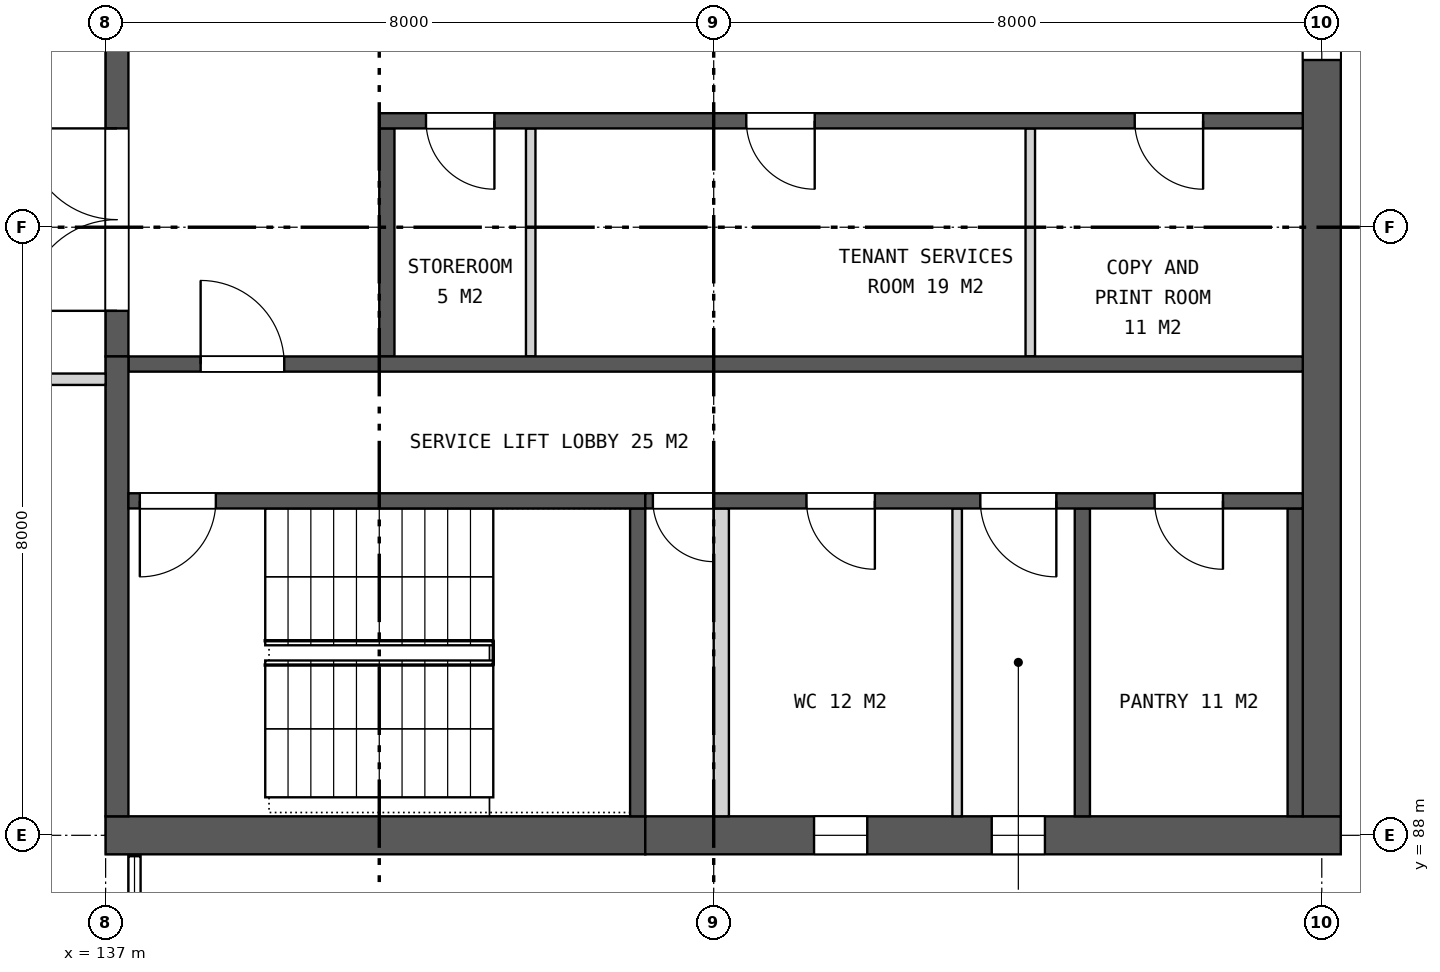
"""IFC4 building model, lengths in metres.
Left out: names, types, materials, properties, quantities, classifications, styles, units other than length and angle.
Written with IfcOpenShell. Run it as: python <this file> out.ifc"""

import sys

from ifc_helpers import new_model, si_unit, direction, frame, frame_2d, origin, place, context, subcontext, project, spatial, rectangle, extrude, element, fill, save


model = new_model("IFC4")
c1 = context("Model", 3, precision=1e-05, world=origin(), true_north=direction((0.0, 1.0)))
c2 = subcontext(c1, "Body", "Model", "MODEL_VIEW")
j1 = project(units=[si_unit("LENGTHUNIT", "METRE"), si_unit("PLANEANGLEUNIT", "RADIAN")], contexts=[c1])
p1 = place(None, origin())
s1 = spatial("IfcSite", under=j1, at=p1, CompositionType="ELEMENT")
p2 = place(p1, origin())
s2 = spatial("IfcBuilding", under=s1, at=p2, CompositionType="ELEMENT")
p3 = place(p2, frame((0.0, 0.0, 295.5)))
s3 = spatial("IfcBuildingStorey", under=s2, at=p3, CompositionType="ELEMENT", Elevation=295.5)
p4 = place(p3, frame((137.0, 88.0, 0.0), z_axis=(0.0, 0.0, 1.0), x_axis=(1.0, 0.0, 0.0)))
e1 = element("IfcWall", 1, at=p4, inside=s3, PredefinedType="SHEAR", context=c2, shape_type="SweptSolid", body=[
    extrude(rectangle(XDim=7.1, YDim=0.5, at=frame_2d((3.55, 0.0))), origin(), (0.0, 0.0, 1.0), 4.2),
])
p5 = place(p3, frame((144.1, 88.0, 0.0), z_axis=(0.0, 0.0, 1.0), x_axis=(1.0, 0.0, 0.0)))
e2 = element("IfcWall", 2, at=p5, inside=s3, PredefinedType="SHEAR", context=c2, shape_type="SweptSolid", body=[
    extrude(rectangle(XDim=9.15, YDim=0.5, at=frame_2d((4.575, 0.0))), origin(), (0.0, 0.0, 1.0), 4.2),
])
p6 = place(p5, frame((2.22, 0.0, 1.5)))
e3 = element("IfcOpeningElement", 3, at=p6, cuts=e2, PredefinedType="OPENING", context=c2, shape_type="SweptSolid", body=[
    extrude(rectangle(XDim=0.7, YDim=0.9, at=frame_2d((0.35, 0.45))), frame((0.0, 0.26, 0.0), z_axis=(0.0, -1.0, 0.0), x_axis=(1.0, 0.0, 0.0)), (0.0, 0.0, 1.0), 0.52),
])
p7 = place(p5, frame((4.558, 0.0, 1.5)))
e4 = element("IfcOpeningElement", 4, at=p7, cuts=e2, PredefinedType="OPENING", context=c2, shape_type="SweptSolid", body=[
    extrude(rectangle(XDim=0.7, YDim=0.9, at=frame_2d((0.35, 0.45))), frame((0.0, 0.26, 0.0), z_axis=(0.0, -1.0, 0.0), x_axis=(1.0, 0.0, 0.0)), (0.0, 0.0, 1.0), 0.52),
])
p8 = place(p3, frame((153.0, 88.25, 0.0), z_axis=(0.0, 0.0, 1.0), x_axis=(0.0, 1.0, 0.0)))
e5 = element("IfcWall", 5, at=p8, inside=s3, PredefinedType="SHEAR", context=c2, shape_type="SweptSolid", body=[
    extrude(rectangle(XDim=23.5, YDim=0.5, at=frame_2d((11.75, 0.0))), origin(), (0.0, 0.0, 1.0), 4.2),
])
p9 = place(p8, frame((9.95, 0.0, 0.15)))
e6 = element("IfcOpeningElement", 6, at=p9, cuts=e5, PredefinedType="OPENING", context=c2, shape_type="SweptSolid", body=[
    extrude(rectangle(XDim=3.6, YDim=3.0, at=frame_2d((1.8, 1.5))), frame((0.0, 0.26, 0.0), z_axis=(0.0, -1.0, 0.0), x_axis=(1.0, 0.0, 0.0)), (0.0, 0.0, 1.0), 0.52),
])
p10 = place(p3, frame((137.15, 94.3, 0.0), z_axis=(0.0, 0.0, 1.0), x_axis=(0.0, 1.0, 0.0)))
e7 = element("IfcWall", 7, at=p10, inside=s3, PredefinedType="SHEAR", context=c2, shape_type="SweptSolid", body=[
    extrude(rectangle(XDim=11.4, YDim=0.3, at=frame_2d((5.7, 0.0))), origin(), (0.0, 0.0, 1.0), 4.2),
])
p11 = place(p10, frame((0.6, 0.0, 0.0)))
e8 = element("IfcOpeningElement", 8, at=p11, cuts=e7, PredefinedType="OPENING", context=c2, shape_type="SweptSolid", body=[
    extrude(rectangle(XDim=2.4, YDim=2.4, at=frame_2d((1.2, 1.2))), frame((0.0, 0.16, 0.0), z_axis=(0.0, -1.0, 0.0), x_axis=(1.0, 0.0, 0.0)), (0.0, 0.0, 1.0), 0.32),
])
p12 = place(p10, frame((4.5, 0.0, 0.0)))
e9 = element("IfcOpeningElement", 9, at=p12, cuts=e7, PredefinedType="OPENING", context=c2, shape_type="SweptSolid", body=[
    extrude(rectangle(XDim=2.4, YDim=2.4, at=frame_2d((1.2, 1.2))), frame((0.0, 0.16, 0.0), z_axis=(0.0, -1.0, 0.0), x_axis=(1.0, 0.0, 0.0)), (0.0, 0.0, 1.0), 0.32),
])
p13 = place(p10, frame((8.4, 0.0, 0.0)))
e10 = element("IfcOpeningElement", 10, at=p13, cuts=e7, PredefinedType="OPENING", context=c2, shape_type="SweptSolid", body=[
    extrude(rectangle(XDim=2.4, YDim=2.4, at=frame_2d((1.2, 1.2))), frame((0.0, 0.16, 0.0), z_axis=(0.0, -1.0, 0.0), x_axis=(1.0, 0.0, 0.0)), (0.0, 0.0, 1.0), 0.32),
])
p14 = place(p3, frame((140.7, 94.3, 0.0), z_axis=(0.0, 0.0, 1.0), x_axis=(0.0, 1.0, 0.0)))
e11 = element("IfcWall", 11, at=p14, inside=s3, PredefinedType="SHEAR", context=c2, shape_type="SweptSolid", body=[
    extrude(rectangle(XDim=3.0, YDim=0.2, at=frame_2d((1.5, 0.0))), origin(), (0.0, 0.0, 1.0), 4.2),
])
for number, where, z_axis, x_axis in (
    (12, (142.593, 94.3, 0.0), (0.0, 0.0, 1.0), (0.0, 1.0, 0.0)),
    (13, (149.165, 94.3, 0.0), (0.0, 0.0, 1.0), (0.0, 1.0, 0.0)),
):
    element("IfcWall", number, at=place(p3, frame(where, z_axis=z_axis, x_axis=x_axis)), inside=s3, PredefinedType="PARTITIONING", context=c2, shape_type="SweptSolid", body=[
        extrude(rectangle(XDim=3.0, YDim=0.125, at=frame_2d((1.5, 0.0))), origin(), (0.0, 0.0, 1.0), 4.2),
    ])
p15 = place(p3, frame((140.6, 97.4, 0.0), z_axis=(0.0, 0.0, 1.0), x_axis=(1.0, 0.0, 0.0)))
e14 = element("IfcWall", 14, at=p15, inside=s3, PredefinedType="SHEAR", context=c2, shape_type="SweptSolid", body=[
    extrude(rectangle(XDim=12.15, YDim=0.2, at=frame_2d((6.075, 0.0))), origin(), (0.0, 0.0, 1.0), 4.2),
])
p16 = place(p15, frame((0.615, 0.0, 0.0)))
e15 = element("IfcOpeningElement", 15, at=p16, cuts=e14, PredefinedType="OPENING", context=c2, shape_type="SweptSolid", body=[
    extrude(rectangle(XDim=0.9, YDim=2.1, at=frame_2d((0.45, 1.05))), frame((0.0, 0.11, 0.0), z_axis=(0.0, -1.0, 0.0), x_axis=(1.0, 0.0, 0.0)), (0.0, 0.0, 1.0), 0.22),
])
p17 = place(p15, frame((4.829, 0.0, 0.0)))
e16 = element("IfcOpeningElement", 16, at=p17, cuts=e14, PredefinedType="OPENING", context=c2, shape_type="SweptSolid", body=[
    extrude(rectangle(XDim=0.9, YDim=2.1, at=frame_2d((0.45, 1.05))), frame((0.0, 0.11, 0.0), z_axis=(0.0, -1.0, 0.0), x_axis=(1.0, 0.0, 0.0)), (0.0, 0.0, 1.0), 0.22),
])
p18 = place(p15, frame((9.939, 0.0, 0.0)))
e17 = element("IfcOpeningElement", 17, at=p18, cuts=e14, PredefinedType="OPENING", context=c2, shape_type="SweptSolid", body=[
    extrude(rectangle(XDim=0.9, YDim=2.1, at=frame_2d((0.45, 1.05))), frame((0.0, 0.11, 0.0), z_axis=(0.0, -1.0, 0.0), x_axis=(1.0, 0.0, 0.0)), (0.0, 0.0, 1.0), 0.22),
])
p19 = place(p3, frame((137.3, 94.2, 0.0), z_axis=(0.0, 0.0, 1.0), x_axis=(1.0, 0.0, 0.0)))
e18 = element("IfcWall", 18, at=p19, inside=s3, PredefinedType="SHEAR", context=c2, shape_type="SweptSolid", body=[
    extrude(rectangle(XDim=15.45, YDim=0.2, at=frame_2d((7.725, 0.0))), origin(), (0.0, 0.0, 1.0), 4.2),
])
p20 = place(p19, frame((0.95, 0.0, 0.0)))
e19 = element("IfcOpeningElement", 19, at=p20, cuts=e18, PredefinedType="OPENING", context=c2, shape_type="SweptSolid", body=[
    extrude(rectangle(XDim=1.1, YDim=2.1, at=frame_2d((0.55, 1.05))), frame((0.0, 0.11, 0.0), z_axis=(0.0, -1.0, 0.0), x_axis=(1.0, 0.0, 0.0)), (0.0, 0.0, 1.0), 0.22),
])
p21 = place(p3, frame((137.15, 88.25, 0.0), z_axis=(0.0, 0.0, 1.0), x_axis=(0.0, 1.0, 0.0)))
e20 = element("IfcWall", 20, at=p21, inside=s3, PredefinedType="SHEAR", context=c2, shape_type="SweptSolid", body=[
    extrude(rectangle(XDim=6.05, YDim=0.3, at=frame_2d((3.025, 0.0))), origin(), (0.0, 0.0, 1.0), 4.2),
])
for number, where, z_axis, x_axis in (
    (21, (144.0, 88.25, 0.0), (0.0, 0.0, 1.0), (0.0, 1.0, 0.0)),
    (22, (149.85, 88.25, 0.0), (0.0, 0.0, 1.0), (0.0, 1.0, 0.0)),
    (23, (152.65, 88.25, 0.0), (0.0, 0.0, 1.0), (0.0, 1.0, 0.0)),
):
    element("IfcWall", number, at=place(p3, frame(where, z_axis=z_axis, x_axis=x_axis)), inside=s3, PredefinedType="SHEAR", context=c2, shape_type="SweptSolid", body=[
        extrude(rectangle(XDim=4.05, YDim=0.2, at=frame_2d((2.025, 0.0))), origin(), (0.0, 0.0, 1.0), 4.2),
    ])
p22 = place(p3, frame((145.1, 88.25, 0.0), z_axis=(0.0, 0.0, 1.0), x_axis=(0.0, 1.0, 0.0)))
e24 = element("IfcWall", 24, at=p22, inside=s3, PredefinedType="PARTITIONING", context=c2, shape_type="SweptSolid", body=[
    extrude(rectangle(XDim=4.05, YDim=0.2, at=frame_2d((2.025, 0.0))), origin(), (0.0, 0.0, 1.0), 4.2),
])
p23 = place(p3, frame((148.203, 88.25, 0.0), z_axis=(0.0, 0.0, 1.0), x_axis=(0.0, 1.0, 0.0)))
e25 = element("IfcWall", 25, at=p23, inside=s3, PredefinedType="PARTITIONING", context=c2, shape_type="SweptSolid", body=[
    extrude(rectangle(XDim=4.05, YDim=0.125, at=frame_2d((2.025, 0.0))), origin(), (0.0, 0.0, 1.0), 4.2),
])
p24 = place(p3, frame((137.3, 92.4, 0.0), z_axis=(0.0, 0.0, 1.0), x_axis=(1.0, 0.0, 0.0)))
e26 = element("IfcWall", 26, at=p24, inside=s3, PredefinedType="SHEAR", context=c2, shape_type="SweptSolid", body=[
    extrude(rectangle(XDim=6.8, YDim=0.2, at=frame_2d((3.4, 0.0))), origin(), (0.0, 0.0, 1.0), 4.2),
])
p25 = place(p24, frame((0.15, 0.0, 0.0)))
e27 = element("IfcOpeningElement", 27, at=p25, cuts=e26, PredefinedType="OPENING", context=c2, shape_type="SweptSolid", body=[
    extrude(rectangle(XDim=1.0, YDim=2.1, at=frame_2d((0.5, 1.05))), frame((0.0, 0.11, 0.0), z_axis=(0.0, -1.0, 0.0), x_axis=(1.0, 0.0, 0.0)), (0.0, 0.0, 1.0), 0.22),
])
p26 = place(p3, frame((144.1, 92.4, 0.0), z_axis=(0.0, 0.0, 1.0), x_axis=(1.0, 0.0, 0.0)))
e28 = element("IfcWall", 28, at=p26, inside=s3, PredefinedType="SHEAR", context=c2, shape_type="SweptSolid", body=[
    extrude(rectangle(XDim=8.65, YDim=0.2, at=frame_2d((4.325, 0.0))), origin(), (0.0, 0.0, 1.0), 4.2),
])
p27 = place(p26, frame((0.1, 0.0, 0.0)))
e29 = element("IfcOpeningElement", 29, at=p27, cuts=e28, PredefinedType="OPENING", context=c2, shape_type="SweptSolid", body=[
    extrude(rectangle(XDim=0.8, YDim=2.1, at=frame_2d((0.4, 1.05))), frame((0.0, 0.11, 0.0), z_axis=(0.0, -1.0, 0.0), x_axis=(1.0, 0.0, 0.0)), (0.0, 0.0, 1.0), 0.22),
])
p28 = place(p26, frame((2.12, 0.0, 0.0)))
e30 = element("IfcOpeningElement", 30, at=p28, cuts=e28, PredefinedType="OPENING", context=c2, shape_type="SweptSolid", body=[
    extrude(rectangle(XDim=0.9, YDim=2.1, at=frame_2d((0.45, 1.05))), frame((0.0, 0.11, 0.0), z_axis=(0.0, -1.0, 0.0), x_axis=(1.0, 0.0, 0.0)), (0.0, 0.0, 1.0), 0.22),
])
p29 = place(p26, frame((4.408, 0.0, 0.0)))
e31 = element("IfcOpeningElement", 31, at=p29, cuts=e28, PredefinedType="OPENING", context=c2, shape_type="SweptSolid", body=[
    extrude(rectangle(XDim=1.0, YDim=2.1, at=frame_2d((0.5, 1.05))), frame((0.0, 0.11, 0.0), z_axis=(0.0, -1.0, 0.0), x_axis=(1.0, 0.0, 0.0)), (0.0, 0.0, 1.0), 0.22),
])
p30 = place(p26, frame((6.7, 0.0, 0.0)))
e32 = element("IfcOpeningElement", 32, at=p30, cuts=e28, PredefinedType="OPENING", context=c2, shape_type="SweptSolid", body=[
    extrude(rectangle(XDim=0.9, YDim=2.1, at=frame_2d((0.45, 1.05))), frame((0.0, 0.11, 0.0), z_axis=(0.0, -1.0, 0.0), x_axis=(1.0, 0.0, 0.0)), (0.0, 0.0, 1.0), 0.22),
])
p31 = place(p3, frame((131.475, 94.0, 0.0), z_axis=(0.0, 0.0, 1.0), x_axis=(1.0, 0.0, 0.0)))
e33 = element("IfcWall", 33, at=p31, inside=s3, PredefinedType="PARTITIONING", context=c2, shape_type="SweptSolid", body=[
    extrude(rectangle(XDim=5.525, YDim=0.15, at=frame_2d((2.762, 0.0))), origin(), (0.0, 0.0, 1.0), 3.443),
])
p32 = place(p6, origin())
e34 = element("IfcWindow", 34, at=p32, inside=s3, PartitioningType="SINGLE_PANEL", PredefinedType="WINDOW", context=c2, shape_type="SweptSolid", body=[
    extrude(rectangle(XDim=0.7, YDim=0.9, at=frame_2d((0.35, 0.45))), frame((0.0, 0.03, 0.0), z_axis=(0.0, -1.0, 0.0), x_axis=(1.0, 0.0, 0.0)), (0.0, 0.0, 1.0), 0.06),
])
fill(e3, e34)
p33 = place(p7, origin())
e35 = element("IfcWindow", 35, at=p33, inside=s3, PartitioningType="SINGLE_PANEL", PredefinedType="WINDOW", context=c2, shape_type="SweptSolid", body=[
    extrude(rectangle(XDim=0.7, YDim=0.9, at=frame_2d((0.35, 0.45))), frame((0.0, 0.03, 0.0), z_axis=(0.0, -1.0, 0.0), x_axis=(1.0, 0.0, 0.0)), (0.0, 0.0, 1.0), 0.06),
])
fill(e4, e35)
p34 = place(p9, origin())
e36 = element("IfcWindow", 36, at=p34, inside=s3, PartitioningType="SINGLE_PANEL", PredefinedType="WINDOW", context=c2, shape_type="SweptSolid", body=[
    extrude(rectangle(XDim=3.6, YDim=3.0, at=frame_2d((1.8, 1.5))), frame((0.0, 0.03, 0.0), z_axis=(0.0, -1.0, 0.0), x_axis=(1.0, 0.0, 0.0)), (0.0, 0.0, 1.0), 0.06),
])
fill(e6, e36)
p35 = place(p11, origin())
e37 = element("IfcDoor", 37, at=p35, inside=s3, OperationType="DOUBLE_DOOR_SINGLE_SWING", PredefinedType="DOOR", context=c2, shape_type="SweptSolid", body=[
    extrude(rectangle(XDim=2.4, YDim=2.4, at=frame_2d((1.2, 1.2))), frame((0.0, 0.025, 0.0), z_axis=(0.0, -1.0, 0.0), x_axis=(1.0, 0.0, 0.0)), (0.0, 0.0, 1.0), 0.05),
])
fill(e8, e37)
p36 = place(p16, frame((0.9, 0.0, 0.0), z_axis=(0.0, 0.0, 1.0), x_axis=(-1.0, 0.0, 0.0)))
e38 = element("IfcDoor", 38, at=p36, inside=s3, OperationType="SINGLE_SWING_LEFT", PredefinedType="DOOR", context=c2, shape_type="SweptSolid", body=[
    extrude(rectangle(XDim=0.9, YDim=2.1, at=frame_2d((0.45, 1.05))), frame((0.0, 0.025, 0.0), z_axis=(0.0, -1.0, 0.0), x_axis=(1.0, 0.0, 0.0)), (0.0, 0.0, 1.0), 0.05),
])
fill(e15, e38)
p37 = place(p17, frame((0.9, 0.0, 0.0), z_axis=(0.0, 0.0, 1.0), x_axis=(-1.0, 0.0, 0.0)))
e39 = element("IfcDoor", 39, at=p37, inside=s3, OperationType="SINGLE_SWING_LEFT", PredefinedType="DOOR", context=c2, shape_type="SweptSolid", body=[
    extrude(rectangle(XDim=0.9, YDim=2.1, at=frame_2d((0.45, 1.05))), frame((0.0, 0.025, 0.0), z_axis=(0.0, -1.0, 0.0), x_axis=(1.0, 0.0, 0.0)), (0.0, 0.0, 1.0), 0.05),
])
fill(e16, e39)
p38 = place(p18, frame((0.9, 0.0, 0.0), z_axis=(0.0, 0.0, 1.0), x_axis=(-1.0, 0.0, 0.0)))
e40 = element("IfcDoor", 40, at=p38, inside=s3, OperationType="SINGLE_SWING_LEFT", PredefinedType="DOOR", context=c2, shape_type="SweptSolid", body=[
    extrude(rectangle(XDim=0.9, YDim=2.1, at=frame_2d((0.45, 1.05))), frame((0.0, 0.025, 0.0), z_axis=(0.0, -1.0, 0.0), x_axis=(1.0, 0.0, 0.0)), (0.0, 0.0, 1.0), 0.05),
])
fill(e17, e40)
p39 = place(p20, origin())
e41 = element("IfcDoor", 41, at=p39, inside=s3, OperationType="SINGLE_SWING_LEFT", PredefinedType="DOOR", context=c2, shape_type="SweptSolid", body=[
    extrude(rectangle(XDim=1.1, YDim=2.1, at=frame_2d((0.55, 1.05))), frame((0.0, 0.025, 0.0), z_axis=(0.0, -1.0, 0.0), x_axis=(1.0, 0.0, 0.0)), (0.0, 0.0, 1.0), 0.05),
])
fill(e19, e41)
p40 = place(p25, frame((1.0, 0.0, 0.0), z_axis=(0.0, 0.0, 1.0), x_axis=(-1.0, 0.0, 0.0)))
e42 = element("IfcDoor", 42, at=p40, inside=s3, OperationType="SINGLE_SWING_RIGHT", PredefinedType="DOOR", context=c2, shape_type="SweptSolid", body=[
    extrude(rectangle(XDim=1.0, YDim=2.1, at=frame_2d((0.5, 1.05))), frame((0.0, 0.025, 0.0), z_axis=(0.0, -1.0, 0.0), x_axis=(1.0, 0.0, 0.0)), (0.0, 0.0, 1.0), 0.05),
])
fill(e27, e42)
p41 = place(p27, frame((0.8, 0.0, 0.0), z_axis=(0.0, 0.0, 1.0), x_axis=(-1.0, 0.0, 0.0)))
e43 = element("IfcDoor", 43, at=p41, inside=s3, OperationType="SINGLE_SWING_LEFT", PredefinedType="DOOR", context=c2, shape_type="SweptSolid", body=[
    extrude(rectangle(XDim=0.8, YDim=2.1, at=frame_2d((0.4, 1.05))), frame((0.0, 0.025, 0.0), z_axis=(0.0, -1.0, 0.0), x_axis=(1.0, 0.0, 0.0)), (0.0, 0.0, 1.0), 0.05),
])
fill(e29, e43)
p42 = place(p28, frame((0.9, 0.0, 0.0), z_axis=(0.0, 0.0, 1.0), x_axis=(-1.0, 0.0, 0.0)))
e44 = element("IfcDoor", 44, at=p42, inside=s3, OperationType="SINGLE_SWING_LEFT", PredefinedType="DOOR", context=c2, shape_type="SweptSolid", body=[
    extrude(rectangle(XDim=0.9, YDim=2.1, at=frame_2d((0.45, 1.05))), frame((0.0, 0.025, 0.0), z_axis=(0.0, -1.0, 0.0), x_axis=(1.0, 0.0, 0.0)), (0.0, 0.0, 1.0), 0.05),
])
fill(e30, e44)
p43 = place(p29, frame((1.0, 0.0, 0.0), z_axis=(0.0, 0.0, 1.0), x_axis=(-1.0, 0.0, 0.0)))
e45 = element("IfcDoor", 45, at=p43, inside=s3, OperationType="SINGLE_SWING_LEFT", PredefinedType="DOOR", context=c2, shape_type="SweptSolid", body=[
    extrude(rectangle(XDim=1.0, YDim=2.1, at=frame_2d((0.5, 1.05))), frame((0.0, 0.025, 0.0), z_axis=(0.0, -1.0, 0.0), x_axis=(1.0, 0.0, 0.0)), (0.0, 0.0, 1.0), 0.05),
])
fill(e31, e45)
p44 = place(p30, frame((0.9, 0.0, 0.0), z_axis=(0.0, 0.0, 1.0), x_axis=(-1.0, 0.0, 0.0)))
e46 = element("IfcDoor", 46, at=p44, inside=s3, OperationType="SINGLE_SWING_LEFT", PredefinedType="DOOR", context=c2, shape_type="SweptSolid", body=[
    extrude(rectangle(XDim=0.9, YDim=2.1, at=frame_2d((0.45, 1.05))), frame((0.0, 0.025, 0.0), z_axis=(0.0, -1.0, 0.0), x_axis=(1.0, 0.0, 0.0)), (0.0, 0.0, 1.0), 0.05),
])
fill(e32, e46)
save(model, sys.argv[1])
